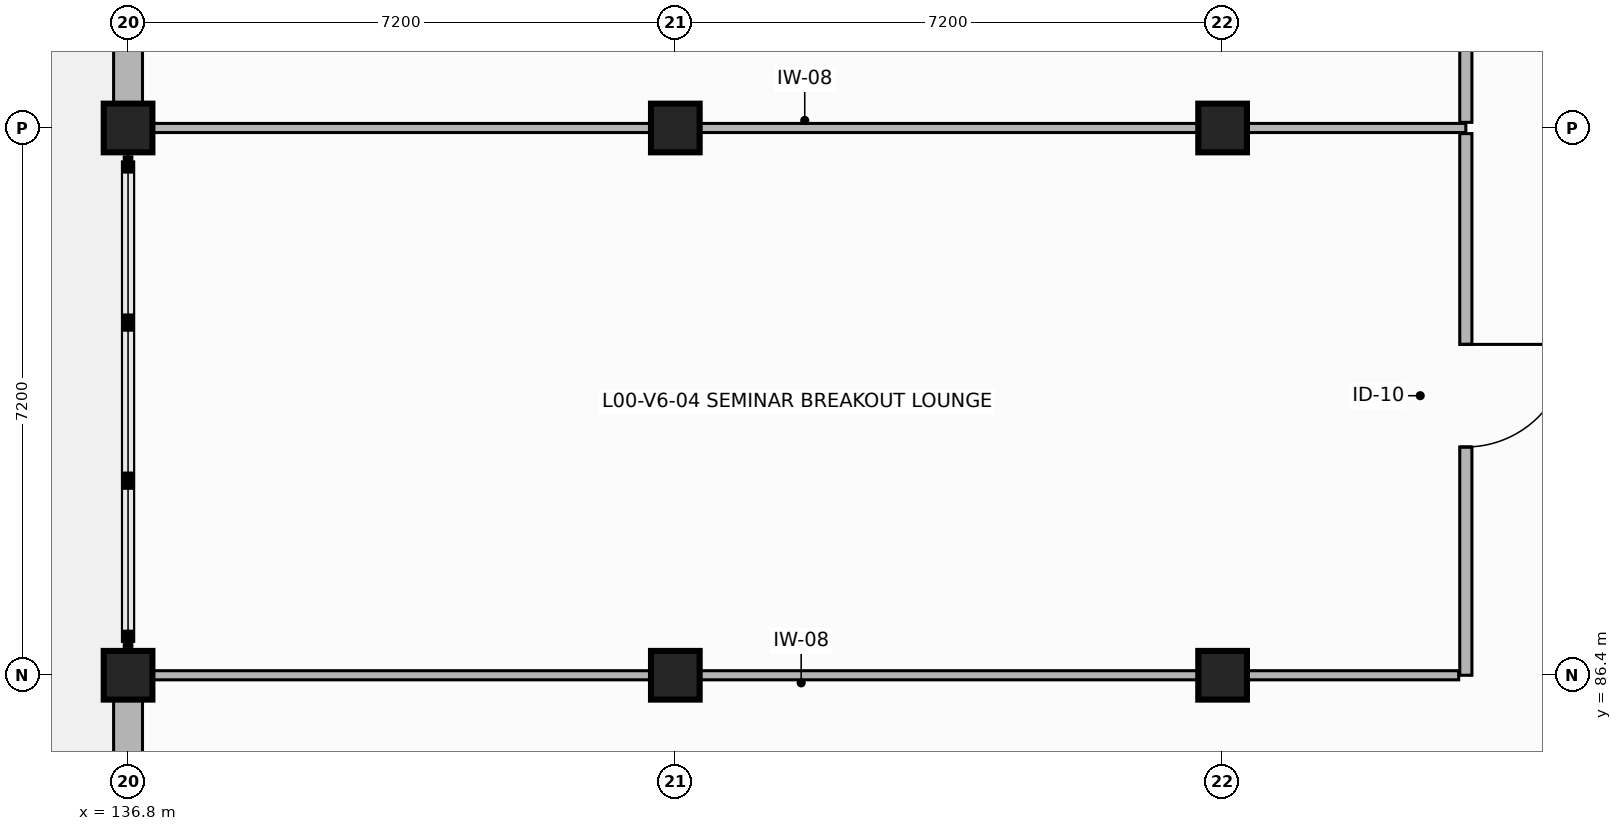
"""IFC4 building model, lengths in metres.
Left out: names, types, materials, properties, quantities, classifications, styles, units other than length and angle.
Written with IfcOpenShell. Run it as: python <this file> out.ifc"""

import sys

from ifc_helpers import new_model, si_unit, direction, frame, frame_2d, origin, origin_2d, place, context, subcontext, project, spatial, rectangle, extrude, element, fill, save


model = new_model("IFC4")
c1 = context("Model", 3, precision=1e-05, world=origin(), true_north=direction((0.0, 1.0)))
c2 = subcontext(c1, "Body", "Model", "MODEL_VIEW")
j1 = project(units=[si_unit("LENGTHUNIT", "METRE"), si_unit("PLANEANGLEUNIT", "RADIAN")], contexts=[c1])
p1 = place(None, origin())
s1 = spatial("IfcSite", under=j1, at=p1, CompositionType="ELEMENT")
p2 = place(p1, origin())
s2 = spatial("IfcBuilding", under=s1, at=p2, CompositionType="ELEMENT")
p3 = place(p2, origin())
s3 = spatial("IfcBuildingStorey", under=s2, at=p3, CompositionType="ELEMENT", Elevation=0.0)
for number, where, z_axis, x_axis in (
    (1, (136.8, 86.4, -0.38), (0.0, 0.0, 1.0), (1.0, 0.0, 0.0)),
    (2, (136.8, 93.6, -0.38), (0.0, 0.0, 1.0), (1.0, 0.0, 0.0)),
    (3, (144.0, 86.4, -0.38), (0.0, 0.0, 1.0), (1.0, 0.0, 0.0)),
    (4, (144.0, 93.6, -0.38), (0.0, 0.0, 1.0), (1.0, 0.0, 0.0)),
    (5, (151.2, 86.4, -0.38), (0.0, 0.0, 1.0), (1.0, 0.0, 0.0)),
    (6, (151.2, 93.6, -0.38), (0.0, 0.0, 1.0), (1.0, 0.0, 0.0)),
):
    element("IfcColumn", number, at=place(p3, frame(where, z_axis=z_axis, x_axis=x_axis)), inside=s3, PredefinedType="COLUMN", context=c2, shape_type="SweptSolid", body=[
        extrude(rectangle(XDim=0.64, YDim=0.64, at=origin_2d()), origin(), (0.0, 0.0, 1.0), 4.56),
    ])
p4 = place(p3, frame((136.8, 100.8, 0.0), z_axis=(0.0, 0.0, 1.0), x_axis=(0.0, -1.0, 0.0)))
e7 = element("IfcWall", 7, at=p4, inside=s3, PredefinedType="SOLIDWALL", context=c2, shape_type="SweptSolid", body=[
    extrude(rectangle(XDim=7.2, YDim=0.38, at=frame_2d((3.6, 0.0))), origin(), (0.0, 0.0, 1.0), 3.51),
])
p5 = place(p4, frame((4.4, 0.0, 0.85)))
e8 = element("IfcOpeningElement", 8, at=p5, cuts=e7, PredefinedType="OPENING", context=c2, shape_type="SweptSolid", body=[
    extrude(rectangle(XDim=1.6, YDim=2.45, at=frame_2d((0.8, 1.225))), frame((0.0, 0.2, 0.0), z_axis=(0.0, -1.0, 0.0), x_axis=(1.0, 0.0, 0.0)), (0.0, 0.0, 1.0), 0.4),
])
p6 = place(p3, frame((136.8, 86.4, 0.0), z_axis=(0.0, 0.0, 1.0), x_axis=(0.0, -1.0, 0.0)))
e9 = element("IfcWall", 9, at=p6, inside=s3, PredefinedType="SOLIDWALL", context=c2, shape_type="SweptSolid", body=[
    extrude(rectangle(XDim=7.2, YDim=0.38, at=frame_2d((3.6, 0.0))), origin(), (0.0, 0.0, 1.0), 3.51),
])
p7 = place(p6, frame((2.7, 0.0, 0.0)))
e10 = element("IfcOpeningElement", 10, at=p7, cuts=e9, PredefinedType="OPENING", context=c2, shape_type="SweptSolid", body=[
    extrude(rectangle(XDim=2.2, YDim=2.6, at=frame_2d((1.1, 1.3))), frame((0.0, 0.2, 0.0), z_axis=(0.0, -1.0, 0.0), x_axis=(1.0, 0.0, 0.0)), (0.0, 0.0, 1.0), 0.4),
])
p8 = place(p3, frame((137.005, 93.6, 0.0), z_axis=(0.0, 0.0, 1.0), x_axis=(1.0, 0.0, 0.0)))
e11 = element("IfcWall", 11, at=p8, inside=s3, PredefinedType="PARTITIONING", context=c2, shape_type="SweptSolid", body=[
    extrude(rectangle(XDim=17.395, YDim=0.12, at=frame_2d((8.698, 0.0))), origin(), (0.0, 0.0, 1.0), 3.49),
])
p9 = place(p3, frame((154.4, 93.526, 0.0), z_axis=(0.0, 0.0, 1.0), x_axis=(0.0, -1.0, 0.0)))
e12 = element("IfcWall", 12, at=p9, inside=s3, PredefinedType="PARTITIONING", context=c2, shape_type="SweptSolid", body=[
    extrude(rectangle(XDim=7.126, YDim=0.16, at=frame_2d((3.563, 0.0))), origin(), (0.0, 0.0, 1.0), 3.49),
])
p10 = place(p9, frame((2.773, 0.0, 0.0)))
e13 = element("IfcOpeningElement", 13, at=p10, cuts=e12, PredefinedType="OPENING", context=c2, shape_type="SweptSolid", body=[
    extrude(rectangle(XDim=1.35, YDim=2.25, at=frame_2d((0.675, 1.125))), frame((0.0, 0.09, 0.0), z_axis=(0.0, -1.0, 0.0), x_axis=(1.0, 0.0, 0.0)), (0.0, 0.0, 1.0), 0.18),
])
p11 = place(p3, frame((154.306, 86.4, 0.0), z_axis=(0.0, 0.0, 1.0), x_axis=(-1.0, 0.0, 0.0)))
e14 = element("IfcWall", 14, at=p11, inside=s3, PredefinedType="PARTITIONING", context=c2, shape_type="SweptSolid", body=[
    extrude(rectangle(XDim=17.301, YDim=0.12, at=frame_2d((8.65, 0.0))), origin(), (0.0, 0.0, 1.0), 3.49),
])
p12 = place(p3, frame((154.4, 97.501, 0.0), z_axis=(0.0, 0.0, 1.0), x_axis=(0.0, -1.0, 0.0)))
e15 = element("IfcWall", 15, at=p12, inside=s3, PredefinedType="PARTITIONING", context=c2, shape_type="SweptSolid", body=[
    extrude(rectangle(XDim=3.827, YDim=0.16, at=frame_2d((1.914, 0.0))), origin(), (0.0, 0.0, 1.0), 3.49),
])
p13 = place(p12, frame((0.48, 0.0, 0.0)))
e16 = element("IfcOpeningElement", 16, at=p13, cuts=e15, PredefinedType="OPENING", context=c2, shape_type="SweptSolid", body=[
    extrude(rectangle(XDim=0.98, YDim=2.15, at=frame_2d((0.49, 1.075))), frame((0.0, 0.09, 0.0), z_axis=(0.0, -1.0, 0.0), x_axis=(1.0, 0.0, 0.0)), (0.0, 0.0, 1.0), 0.18),
])
p14 = place(p10, origin())
e17 = element("IfcDoor", 17, at=p14, inside=s3, OperationType="SINGLE_SWING_LEFT", PredefinedType="DOOR", context=c2, shape_type="SweptSolid", body=[
    extrude(rectangle(XDim=1.35, YDim=2.25, at=frame_2d((0.675, 1.125))), frame((0.0, 0.025, 0.0), z_axis=(0.0, -1.0, 0.0), x_axis=(1.0, 0.0, 0.0)), (0.0, 0.0, 1.0), 0.05),
])
fill(e13, e17)
save(model, sys.argv[1])
